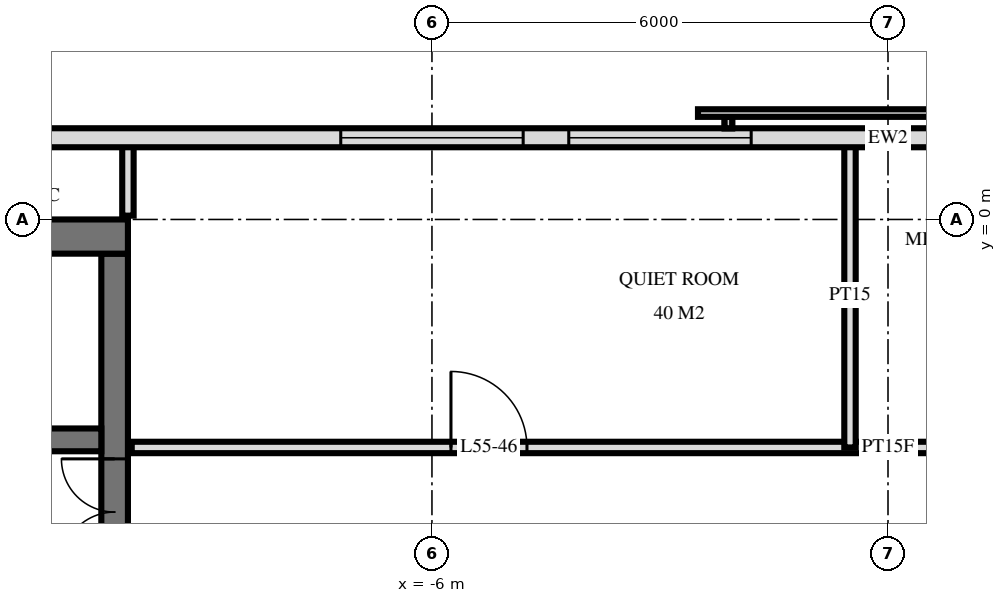
"""IFC4 building model, lengths in metres.
Left out: names, types, materials, properties, quantities, classifications, styles, units other than length and angle.
Written with IfcOpenShell. Run it as: python <this file> out.ifc"""

import sys

from ifc_helpers import new_model, si_unit, direction, frame, frame_2d, origin, place, context, subcontext, project, spatial, rectangle, extrude, element, fill, save


model = new_model("IFC4")
c1 = context("Model", 3, precision=1e-05, world=origin(), true_north=direction((0.0, 1.0)))
c2 = subcontext(c1, "Body", "Model", "MODEL_VIEW")
j1 = project(units=[si_unit("LENGTHUNIT", "METRE"), si_unit("PLANEANGLEUNIT", "RADIAN")], contexts=[c1])
p1 = place(None, origin())
s1 = spatial("IfcSite", under=j1, at=p1, CompositionType="ELEMENT")
p2 = place(p1, origin())
s2 = spatial("IfcBuilding", under=s1, at=p2, CompositionType="ELEMENT")
p3 = place(p2, frame((0.0, 0.0, 211.6)))
s3 = spatial("IfcBuildingStorey", under=s2, at=p3, CompositionType="ELEMENT", Elevation=211.6)
p4 = place(p3, frame((-24.5, -0.225, 0.0), z_axis=(0.0, 0.0, 1.0), x_axis=(1.0, 0.0, 0.0)))
e1 = element("IfcWall", 1, at=p4, inside=s3, PredefinedType="SHEAR", context=c2, shape_type="SweptSolid", body=[
    extrude(rectangle(XDim=14.5, YDim=0.45, at=frame_2d((7.25, 0.0))), origin(), (0.0, 0.0, 1.0), 3.5),
])
p5 = place(p3, frame((-10.175, -14.55, 0.0), z_axis=(0.0, 0.0, 1.0), x_axis=(0.0, 1.0, 0.0)))
e2 = element("IfcWall", 2, at=p5, inside=s3, PredefinedType="SHEAR", context=c2, shape_type="SweptSolid", body=[
    extrude(rectangle(XDim=14.1, YDim=0.35, at=frame_2d((7.05, 0.0))), origin(), (0.0, 0.0, 1.0), 3.5),
])
p6 = place(p5, frame((8.4, 0.0, 0.0)))
e3 = element("IfcOpeningElement", 3, at=p6, cuts=e2, PredefinedType="OPENING", context=c2, shape_type="SweptSolid", body=[
    extrude(rectangle(XDim=1.4, YDim=2.4, at=frame_2d((0.7, 1.2))), frame((0.0, 0.185, 0.0), z_axis=(0.0, -1.0, 0.0), x_axis=(1.0, 0.0, 0.0)), (0.0, 0.0, 1.0), 0.37),
])
p7 = place(p5, frame((10.0, 0.0, 0.0)))
e4 = element("IfcOpeningElement", 4, at=p7, cuts=e2, PredefinedType="OPENING", context=c2, shape_type="SweptSolid", body=[
    extrude(rectangle(XDim=1.4, YDim=2.4, at=frame_2d((0.7, 1.2))), frame((0.0, 0.185, 0.0), z_axis=(0.0, -1.0, 0.0), x_axis=(1.0, 0.0, 0.0)), (0.0, 0.0, 1.0), 0.37),
])
p8 = place(p5, frame((4.0, 0.0, 0.0)))
e5 = element("IfcOpeningElement", 5, at=p8, cuts=e2, PredefinedType="OPENING", context=c2, shape_type="SweptSolid", body=[
    extrude(rectangle(XDim=1.2, YDim=2.1, at=frame_2d((0.6, 1.05))), frame((0.0, 0.185, 0.0), z_axis=(0.0, -1.0, 0.0), x_axis=(1.0, 0.0, 0.0)), (0.0, 0.0, 1.0), 0.37),
])
p9 = place(p3, frame((-24.05, -2.9, 0.0), z_axis=(0.0, 0.0, 1.0), x_axis=(1.0, 0.0, 0.0)))
e6 = element("IfcWall", 6, at=p9, inside=s3, PredefinedType="SHEAR", context=c2, shape_type="SweptSolid", body=[
    extrude(rectangle(XDim=13.7, YDim=0.3, at=frame_2d((6.85, 0.0))), origin(), (0.0, 0.0, 1.0), 3.5),
])
p10 = place(p9, frame((0.55, 0.0, 0.0)))
e7 = element("IfcOpeningElement", 7, at=p10, cuts=e6, PredefinedType="OPENING", context=c2, shape_type="SweptSolid", body=[
    extrude(rectangle(XDim=1.1, YDim=2.1, at=frame_2d((0.55, 1.05))), frame((0.0, 0.16, 0.0), z_axis=(0.0, -1.0, 0.0), x_axis=(1.0, 0.0, 0.0)), (0.0, 0.0, 1.0), 0.32),
])
p11 = place(p9, frame((6.863, 0.0, 0.0)))
e8 = element("IfcOpeningElement", 8, at=p11, cuts=e6, PredefinedType="OPENING", context=c2, shape_type="SweptSolid", body=[
    extrude(rectangle(XDim=0.9, YDim=2.1, at=frame_2d((0.45, 1.05))), frame((0.0, 0.16, 0.0), z_axis=(0.0, -1.0, 0.0), x_axis=(1.0, 0.0, 0.0)), (0.0, 0.0, 1.0), 0.32),
])
p12 = place(p9, frame((5.438, 0.0, 0.0)))
e9 = element("IfcOpeningElement", 9, at=p12, cuts=e6, PredefinedType="OPENING", context=c2, shape_type="SweptSolid", body=[
    extrude(rectangle(XDim=0.9, YDim=2.1, at=frame_2d((0.45, 1.05))), frame((0.0, 0.16, 0.0), z_axis=(0.0, -1.0, 0.0), x_axis=(1.0, 0.0, 0.0)), (0.0, 0.0, 1.0), 0.32),
])
p13 = place(p9, frame((11.85, 0.0, 0.0)))
e10 = element("IfcOpeningElement", 10, at=p13, cuts=e6, PredefinedType="OPENING", context=c2, shape_type="SweptSolid", body=[
    extrude(rectangle(XDim=1.0, YDim=2.1, at=frame_2d((0.5, 1.05))), frame((0.0, 0.16, 0.0), z_axis=(0.0, -1.0, 0.0), x_axis=(1.0, 0.0, 0.0)), (0.0, 0.0, 1.0), 0.32),
])
p14 = place(p9, frame((9.562, 0.0, 0.0)))
e11 = element("IfcOpeningElement", 11, at=p14, cuts=e6, PredefinedType="OPENING", context=c2, shape_type="SweptSolid", body=[
    extrude(rectangle(XDim=1.0, YDim=2.1, at=frame_2d((0.5, 1.05))), frame((0.0, 0.16, 0.0), z_axis=(0.0, -1.0, 0.0), x_axis=(1.0, 0.0, 0.0)), (0.0, 0.0, 1.0), 0.32),
])
p15 = place(p9, frame((8.137, 0.0, 0.0)))
e12 = element("IfcOpeningElement", 12, at=p15, cuts=e6, PredefinedType="OPENING", context=c2, shape_type="SweptSolid", body=[
    extrude(rectangle(XDim=1.0, YDim=2.1, at=frame_2d((0.5, 1.05))), frame((0.0, 0.16, 0.0), z_axis=(0.0, -1.0, 0.0), x_axis=(1.0, 0.0, 0.0)), (0.0, 0.0, 1.0), 0.32),
])
p16 = place(p9, frame((3.0, 0.0, 0.0)))
e13 = element("IfcOpeningElement", 13, at=p16, cuts=e6, PredefinedType="OPENING", context=c2, shape_type="SweptSolid", body=[
    extrude(rectangle(XDim=1.0, YDim=2.1, at=frame_2d((0.5, 1.05))), frame((0.0, 0.16, 0.0), z_axis=(0.0, -1.0, 0.0), x_axis=(1.0, 0.0, 0.0)), (0.0, 0.0, 1.0), 0.32),
])
p17 = place(p3, frame((22.475, 1.075, 0.0), z_axis=(0.0, 0.0, 1.0), x_axis=(-1.0, 0.0, 0.0)))
e14 = element("IfcWall", 14, at=p17, inside=s3, PredefinedType="SOLIDWALL", context=c2, shape_type="SweptSolid", body=[
    extrude(rectangle(XDim=44.951, YDim=0.25, at=frame_2d((22.475, 0.0))), origin(), (0.0, 0.0, 1.0), 3.22),
])
p18 = place(p17, frame((18.275, 0.0, 0.9)))
e15 = element("IfcOpeningElement", 15, at=p18, cuts=e14, PredefinedType="OPENING", context=c2, shape_type="SweptSolid", body=[
    extrude(rectangle(XDim=2.4, YDim=1.5, at=frame_2d((1.2, 0.75))), frame((0.0, 0.135, 0.0), z_axis=(0.0, -1.0, 0.0), x_axis=(1.0, 0.0, 0.0)), (0.0, 0.0, 1.0), 0.27),
])
p19 = place(p17, frame((24.275, 0.0, 0.9)))
e16 = element("IfcOpeningElement", 16, at=p19, cuts=e14, PredefinedType="OPENING", context=c2, shape_type="SweptSolid", body=[
    extrude(rectangle(XDim=2.4, YDim=1.5, at=frame_2d((1.2, 0.75))), frame((0.0, 0.135, 0.0), z_axis=(0.0, -1.0, 0.0), x_axis=(1.0, 0.0, 0.0)), (0.0, 0.0, 1.0), 0.27),
])
p20 = place(p17, frame((27.275, 0.0, 0.9)))
e17 = element("IfcOpeningElement", 17, at=p20, cuts=e14, PredefinedType="OPENING", context=c2, shape_type="SweptSolid", body=[
    extrude(rectangle(XDim=2.4, YDim=1.5, at=frame_2d((1.2, 0.75))), frame((0.0, 0.135, 0.0), z_axis=(0.0, -1.0, 0.0), x_axis=(1.0, 0.0, 0.0)), (0.0, 0.0, 1.0), 0.27),
])
p21 = place(p3, frame((-0.5, -3.0, 0.0), z_axis=(0.0, 0.0, 1.0), x_axis=(0.0, 1.0, 0.0)))
e18 = element("IfcWall", 18, at=p21, inside=s3, PredefinedType="PARTITIONING", context=c2, shape_type="SweptSolid", body=[
    extrude(rectangle(XDim=4.02, YDim=0.15, at=frame_2d((2.01, 0.0))), origin(), (0.0, 0.0, 1.0), 3.22),
])
p22 = place(p3, frame((-10.0, 0.05, 0.0), z_axis=(0.0, 0.0, 1.0), x_axis=(0.0, 1.0, 0.0)))
e19 = element("IfcWall", 19, at=p22, inside=s3, PredefinedType="PARTITIONING", context=c2, shape_type="SweptSolid", body=[
    extrude(rectangle(XDim=0.97, YDim=0.15, at=frame_2d((0.485, 0.0))), origin(), (0.0, 0.0, 1.0), 3.22),
])
p23 = place(p3, frame((-9.95, -3.0, 0.0), z_axis=(0.0, 0.0, 1.0), x_axis=(1.0, 0.0, 0.0)))
e20 = element("IfcWall", 20, at=p23, inside=s3, PredefinedType="PARTITIONING", context=c2, shape_type="SweptSolid", body=[
    extrude(rectangle(XDim=19.9, YDim=0.15, at=frame_2d((9.95, 0.0))), origin(), (0.0, 0.0, 1.0), 3.22),
])
p24 = place(p23, frame((4.2, 0.0, 0.0)))
e21 = element("IfcOpeningElement", 21, at=p24, cuts=e20, PredefinedType="OPENING", context=c2, shape_type="SweptSolid", body=[
    extrude(rectangle(XDim=1.0, YDim=2.1, at=frame_2d((0.5, 1.05))), frame((0.0, 0.085, 0.0), z_axis=(0.0, -1.0, 0.0), x_axis=(1.0, 0.0, 0.0)), (0.0, 0.0, 1.0), 0.17),
])
p25 = place(p23, frame((11.45, 0.0, 0.0)))
e22 = element("IfcOpeningElement", 22, at=p25, cuts=e20, PredefinedType="OPENING", context=c2, shape_type="SweptSolid", body=[
    extrude(rectangle(XDim=1.0, YDim=2.1, at=frame_2d((0.5, 1.05))), frame((0.0, 0.085, 0.0), z_axis=(0.0, -1.0, 0.0), x_axis=(1.0, 0.0, 0.0)), (0.0, 0.0, 1.0), 0.17),
])
p26 = place(p23, frame((15.45, 0.0, 0.0)))
e23 = element("IfcOpeningElement", 23, at=p26, cuts=e20, PredefinedType="OPENING", context=c2, shape_type="SweptSolid", body=[
    extrude(rectangle(XDim=1.0, YDim=2.1, at=frame_2d((0.5, 1.05))), frame((0.0, 0.085, 0.0), z_axis=(0.0, -1.0, 0.0), x_axis=(1.0, 0.0, 0.0)), (0.0, 0.0, 1.0), 0.17),
])
p27 = place(p23, frame((18.2, 0.0, 0.0)))
e24 = element("IfcOpeningElement", 24, at=p27, cuts=e20, PredefinedType="OPENING", context=c2, shape_type="SweptSolid", body=[
    extrude(rectangle(XDim=1.0, YDim=2.1, at=frame_2d((0.5, 1.05))), frame((0.0, 0.085, 0.0), z_axis=(0.0, -1.0, 0.0), x_axis=(1.0, 0.0, 0.0)), (0.0, 0.0, 1.0), 0.17),
])
p28 = place(p19, origin())
e25 = element("IfcWindow", 25, at=p28, inside=s3, PartitioningType="SINGLE_PANEL", PredefinedType="WINDOW", context=c2, shape_type="SweptSolid", body=[
    extrude(rectangle(XDim=2.4, YDim=1.5, at=frame_2d((1.2, 0.75))), frame((0.0, 0.03, 0.0), z_axis=(0.0, -1.0, 0.0), x_axis=(1.0, 0.0, 0.0)), (0.0, 0.0, 1.0), 0.06),
])
fill(e16, e25)
p29 = place(p20, origin())
e26 = element("IfcWindow", 26, at=p29, inside=s3, PartitioningType="SINGLE_PANEL", PredefinedType="WINDOW", context=c2, shape_type="SweptSolid", body=[
    extrude(rectangle(XDim=2.4, YDim=1.5, at=frame_2d((1.2, 0.75))), frame((0.0, 0.03, 0.0), z_axis=(0.0, -1.0, 0.0), x_axis=(1.0, 0.0, 0.0)), (0.0, 0.0, 1.0), 0.06),
])
fill(e17, e26)
p30 = place(p7, origin())
e27 = element("IfcDoor", 27, at=p30, inside=s3, OperationType="DOUBLE_DOOR_SINGLE_SWING", PredefinedType="DOOR", context=c2, shape_type="SweptSolid", body=[
    extrude(rectangle(XDim=1.4, YDim=2.4, at=frame_2d((0.7, 1.2))), frame((0.0, 0.025, 0.0), z_axis=(0.0, -1.0, 0.0), x_axis=(1.0, 0.0, 0.0)), (0.0, 0.0, 1.0), 0.05),
])
fill(e4, e27)
p31 = place(p24, origin())
e28 = element("IfcDoor", 28, at=p31, inside=s3, OperationType="SINGLE_SWING_RIGHT", PredefinedType="DOOR", context=c2, shape_type="SweptSolid", body=[
    extrude(rectangle(XDim=1.0, YDim=2.1, at=frame_2d((0.5, 1.05))), frame((0.0, 0.025, 0.0), z_axis=(0.0, -1.0, 0.0), x_axis=(1.0, 0.0, 0.0)), (0.0, 0.0, 1.0), 0.05),
])
fill(e21, e28)
save(model, sys.argv[1])
